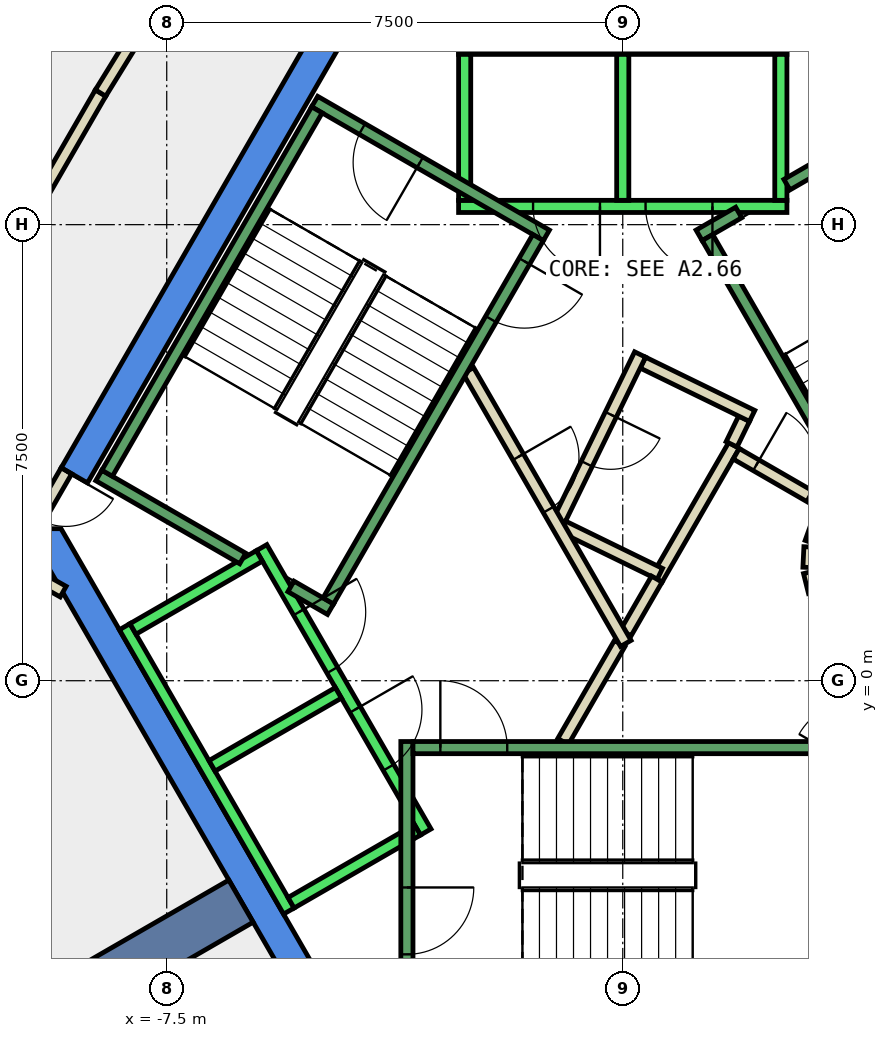
"""IFC4 building model, lengths in metres.
Left out: names, types, materials, properties, quantities, classifications, styles, units other than length and angle.
Written with IfcOpenShell. Run it as: python <this file> out.ifc"""

import sys

from ifc_helpers import new_model, si_unit, direction, frame, frame_2d, origin, place, context, subcontext, project, spatial, polyline, rectangle, outline, extrude, element, fill, save


model = new_model("IFC4")
c1 = context("Model", 3, precision=1e-05, world=origin(), true_north=direction((0.0, 1.0)))
c2 = subcontext(c1, "Body", "Model", "MODEL_VIEW")
j1 = project(units=[si_unit("LENGTHUNIT", "METRE"), si_unit("PLANEANGLEUNIT", "RADIAN")], contexts=[c1])
p1 = place(None, origin())
s1 = spatial("IfcSite", under=j1, at=p1, CompositionType="ELEMENT")
p2 = place(p1, origin())
s2 = spatial("IfcBuilding", under=s1, at=p2, CompositionType="ELEMENT")
p3 = place(p2, frame((0.0, 0.0, 315.2)))
s3 = spatial("IfcBuildingStorey", under=s2, at=p3, CompositionType="ELEMENT", Elevation=315.2)
p4 = place(p3, frame((0.0, 0.0, -0.34)))
e1 = element("IfcWall", 1, at=p4, inside=s3, PredefinedType="SHEAR", context=c2, shape_type="SweptSolid", body=[
    extrude(outline(polyline([(-9.236, 3.502), (-8.803, 3.253), (-4.619, 10.5), (-4.907, 11.0), (-9.236, 3.502)])), origin(), (0.0, 0.0, 1.0), 3.6),
])
p5 = place(p3, frame((0.0, 0.0, -0.34)))
e2 = element("IfcWall", 2, at=p5, inside=s3, PredefinedType="SHEAR", context=c2, shape_type="SweptSolid", body=[
    extrude(outline(polyline([(-9.815, 2.5), (-4.907, -6.0), (-4.619, -5.5), (-9.238, 2.5), (-9.815, 2.5)])), origin(), (0.0, 0.0, 1.0), 3.6),
])
p6 = place(p3, frame((-6.279, -3.625, -0.34), z_axis=(0.0, 0.0, 1.0), x_axis=(-0.866017533419, -0.500013631625, 0.0)))
e3 = element("IfcWall", 3, at=p6, inside=s3, PredefinedType="SHEAR", context=c2, shape_type="SweptSolid", body=[
    extrude(rectangle(XDim=9.0, YDim=0.8, at=frame_2d((4.5, 0.0))), origin(), (0.0, 0.0, 1.0), 3.6),
])
p7 = place(p3, frame((0.56, 1.671, 0.0), z_axis=(0.0, 0.0, 1.0), x_axis=(0.500008334558, 0.866020591771, 0.0)))
e4 = element("IfcWall", 4, at=p7, inside=s3, PredefinedType="PARTITIONING", context=c2, shape_type="SweptSolid", body=[
    extrude(rectangle(XDim=2.538, YDim=0.2, at=frame_2d((1.269, 0.0))), origin(), (0.0, 0.0, 1.0), 3.26),
])
p8 = place(p3, frame((1.79, 3.888, 0.0), z_axis=(0.0, 0.0, 1.0), x_axis=(0.437807406823, 0.899068781869, 0.0)))
e5 = element("IfcWall", 5, at=p8, inside=s3, PredefinedType="PARTITIONING", context=c2, shape_type="SweptSolid", body=[
    extrude(rectangle(XDim=0.469, YDim=0.2, at=frame_2d((0.234, 0.0))), origin(), (0.0, 0.0, 1.0), 3.26),
])
p9 = place(p3, frame((2.128, 4.355, 0.0), z_axis=(0.0, 0.0, 1.0), x_axis=(-0.898876404494, 0.438202247191, 0.0)))
e6 = element("IfcWall", 6, at=p9, inside=s3, PredefinedType="PARTITIONING", context=c2, shape_type="SweptSolid", body=[
    extrude(rectangle(XDim=1.999, YDim=0.2, at=frame_2d((1.0, 0.0))), origin(), (0.0, 0.0, 1.0), 3.26),
])
p10 = place(p3, frame((0.285, 5.365, 0.0), z_axis=(0.0, 0.0, 1.0), x_axis=(-0.43840190643, -0.898779043168, 0.0)))
e7 = element("IfcWall", 7, at=p10, inside=s3, PredefinedType="PARTITIONING", context=c2, shape_type="SweptSolid", body=[
    extrude(rectangle(XDim=3.1, YDim=0.2, at=frame_2d((1.55, 0.0))), origin(), (0.0, 0.0, 1.0), 3.26),
])
p11 = place(p10, frame((1.1, 0.0, 0.0)))
e8 = element("IfcOpeningElement", 8, at=p11, cuts=e7, PredefinedType="OPENING", context=c2, shape_type="SweptSolid", body=[
    extrude(rectangle(XDim=0.9, YDim=2.1, at=frame_2d((0.45, 1.05))), frame((0.0, 0.11, 0.0), z_axis=(0.0, -1.0, 0.0), x_axis=(1.0, 0.0, 0.0)), (0.0, 0.0, 1.0), 0.22),
])
p12 = place(p3, frame((-0.984, 2.535, 0.0), z_axis=(0.0, 0.0, 1.0), x_axis=(0.898707583217, -0.438548378025, 0.0)))
e9 = element("IfcWall", 9, at=p12, inside=s3, PredefinedType="PARTITIONING", context=c2, shape_type="SweptSolid", body=[
    extrude(rectangle(XDim=1.774, YDim=0.2, at=frame_2d((0.887, 0.0))), origin(), (0.0, 0.0, 1.0), 3.26),
])
p13 = place(p3, frame((-9.203, 1.465, 0.0), z_axis=(0.0, 0.0, 1.0), x_axis=(-0.872341127106, 0.488897696823, 0.0)))
e10 = element("IfcWall", 10, at=p13, inside=s3, PredefinedType="PARTITIONING", context=c2, shape_type="SweptSolid", body=[
    extrude(rectangle(XDim=1.667, YDim=0.2, at=frame_2d((0.833, 0.0))), origin(), (0.0, 0.0, 1.0), 3.26),
])
p14 = place(p3, frame((-12.701, 2.54, 0.0), z_axis=(0.0, 0.0, 1.0), x_axis=(0.499946799636, 0.86605611685, 0.0)))
e11 = element("IfcWall", 11, at=p14, inside=s3, PredefinedType="PARTITIONING", context=c2, shape_type="SweptSolid", body=[
    extrude(rectangle(XDim=8.227, YDim=0.2, at=frame_2d((4.114, 0.0))), origin(), (0.0, 0.0, 1.0), 3.26),
])
p15 = place(p14, frame((3.613, 0.0, 0.0)))
e12 = element("IfcOpeningElement", 12, at=p15, cuts=e11, PredefinedType="OPENING", context=c2, shape_type="SweptSolid", body=[
    extrude(rectangle(XDim=1.0, YDim=2.1, at=frame_2d((0.5, 1.05))), frame((0.0, 0.11, 0.0), z_axis=(0.0, -1.0, 0.0), x_axis=(1.0, 0.0, 0.0)), (0.0, 0.0, 1.0), 0.22),
])
p16 = place(p3, frame((-8.588, 9.665, 0.0), z_axis=(0.0, 0.0, 1.0), x_axis=(0.525142215688, 0.851014484778, 0.0)))
e13 = element("IfcWall", 13, at=p16, inside=s3, PredefinedType="PARTITIONING", context=c2, shape_type="SweptSolid", body=[
    extrude(rectangle(XDim=7.872, YDim=0.2, at=frame_2d((3.936, 0.0))), origin(), (0.0, 0.0, 1.0), 3.26),
])
p17 = place(p3, frame((-0.982, -1.0, 0.0), z_axis=(0.0, 0.0, 1.0), x_axis=(0.50024047865, 0.865886518847, 0.0)))
e14 = element("IfcWall", 14, at=p17, inside=s3, PredefinedType="PARTITIONING", context=c2, shape_type="SweptSolid", body=[
    extrude(rectangle(XDim=1.863, YDim=0.2, at=frame_2d((0.931, 0.0))), origin(), (0.0, 0.0, 1.0), 3.26),
])
p18 = place(p3, frame((0.05, 0.787, 0.0), z_axis=(0.0, 0.0, 1.0), x_axis=(0.499819111317, 0.866129814729, 0.0)))
e15 = element("IfcWall", 15, at=p18, inside=s3, PredefinedType="PARTITIONING", context=c2, shape_type="SweptSolid", body=[
    extrude(rectangle(XDim=1.021, YDim=0.2, at=frame_2d((0.51, 0.0))), origin(), (0.0, 0.0, 1.0), 3.26),
])
p19 = place(p3, frame((1.866, 3.732, 0.0), z_axis=(0.0, 0.0, 1.0), x_axis=(0.866043361281, -0.499968895414, 0.0)))
e16 = element("IfcWall", 16, at=p19, inside=s3, PredefinedType="PARTITIONING", context=c2, shape_type="SweptSolid", body=[
    extrude(rectangle(XDim=1.858, YDim=0.2, at=frame_2d((0.929, 0.0))), origin(), (0.0, 0.0, 1.0), 3.26),
])
p20 = place(p19, frame((0.379, 0.0, 0.0)))
e17 = element("IfcOpeningElement", 17, at=p20, cuts=e16, PredefinedType="OPENING", context=c2, shape_type="SweptSolid", body=[
    extrude(rectangle(XDim=1.0, YDim=2.1, at=frame_2d((0.5, 1.05))), frame((0.0, 0.11, 0.0), z_axis=(0.0, -1.0, 0.0), x_axis=(1.0, 0.0, 0.0)), (0.0, 0.0, 1.0), 0.22),
])
p21 = place(p3, frame((3.208, 2.592, 0.0), z_axis=(0.0, 0.0, 1.0), x_axis=(-0.337388820924, -0.941365382578, 0.0)))
e18 = element("IfcWall", 18, at=p21, inside=s3, PredefinedType="PARTITIONING", context=c2, shape_type="SweptSolid", body=[
    extrude(rectangle(XDim=0.338, YDim=0.2, at=frame_2d((0.169, 0.0))), origin(), (0.0, 0.0, 1.0), 3.26),
])
p22 = place(p3, frame((3.079, 2.199, 0.0), z_axis=(0.0, 0.0, 1.0), x_axis=(-0.047771483479, -0.998858290933, 0.0)))
e19 = element("IfcWall", 19, at=p22, inside=s3, PredefinedType="PARTITIONING", context=c2, shape_type="SweptSolid", body=[
    extrude(rectangle(XDim=0.337, YDim=0.2, at=frame_2d((0.169, 0.0))), origin(), (0.0, 0.0, 1.0), 3.26),
])
p23 = place(p3, frame((3.07, 1.786, 0.0), z_axis=(0.0, 0.0, 1.0), x_axis=(0.242705583207, -0.970099994784, 0.0)))
e20 = element("IfcWall", 20, at=p23, inside=s3, PredefinedType="PARTITIONING", context=c2, shape_type="SweptSolid", body=[
    extrude(rectangle(XDim=0.338, YDim=0.2, at=frame_2d((0.169, 0.0))), origin(), (0.0, 0.0, 1.0), 3.26),
])
p24 = place(p3, frame((-2.54, 5.1, 0.0), z_axis=(0.0, 0.0, 1.0), x_axis=(0.499925051871, -0.866068670783, 0.0)))
e21 = element("IfcWall", 21, at=p24, inside=s3, PredefinedType="PARTITIONING", context=c2, shape_type="SweptSolid", body=[
    extrude(rectangle(XDim=5.181, YDim=0.2, at=frame_2d((2.59, 0.0))), origin(), (0.0, 0.0, 1.0), 3.26),
])
p25 = place(p24, frame((1.64, 0.0, 0.0)))
e22 = element("IfcOpeningElement", 22, at=p25, cuts=e21, PredefinedType="OPENING", context=c2, shape_type="SweptSolid", body=[
    extrude(rectangle(XDim=1.0, YDim=2.1, at=frame_2d((0.5, 1.05))), frame((0.0, 0.11, 0.0), z_axis=(0.0, -1.0, 0.0), x_axis=(1.0, 0.0, 0.0)), (0.0, 0.0, 1.0), 0.22),
])
p26 = place(p3, frame((-9.15, 3.452, 0.0), z_axis=(0.0, 0.0, 1.0), x_axis=(-0.500079945886, -0.865979242085, 0.0)))
e23 = element("IfcWall", 23, at=p26, inside=s3, PredefinedType="PARTITIONING", context=c2, shape_type="SweptSolid", body=[
    extrude(rectangle(XDim=0.926, YDim=0.2, at=frame_2d((0.463, 0.0))), origin(), (0.0, 0.0, 1.0), 2.4),
])
p27 = place(p26, frame((0.017, 0.0, 0.0)))
e24 = element("IfcOpeningElement", 24, at=p27, cuts=e23, PredefinedType="OPENING", context=c2, shape_type="SweptSolid", body=[
    extrude(rectangle(XDim=0.9, YDim=2.1, at=frame_2d((0.45, 1.05))), frame((0.0, 0.11, 0.0), z_axis=(0.0, -1.0, 0.0), x_axis=(1.0, 0.0, 0.0)), (0.0, 0.0, 1.0), 0.22),
])
p28 = place(p3, frame((2.7, 7.8, 0.0), z_axis=(0.0, 0.0, 1.0), x_axis=(-1.0, 0.0, 0.0)))
e25 = element("IfcWall", 25, at=p28, inside=s3, PredefinedType="STANDARD", context=c2, shape_type="SweptSolid", body=[
    extrude(rectangle(XDim=5.4, YDim=0.2, at=frame_2d((2.7, 0.0))), origin(), (0.0, 0.0, 1.0), 3.26),
])
p29 = place(p28, frame((1.225, 0.0, 0.0)))
e26 = element("IfcOpeningElement", 26, at=p29, cuts=e25, PredefinedType="OPENING", context=c2, shape_type="SweptSolid", body=[
    extrude(rectangle(XDim=1.1, YDim=2.1, at=frame_2d((0.55, 1.05))), frame((0.0, 0.11, 0.0), z_axis=(0.0, -1.0, 0.0), x_axis=(1.0, 0.0, 0.0)), (0.0, 0.0, 1.0), 0.22),
])
p30 = place(p28, frame((3.075, 0.0, 0.0)))
e27 = element("IfcOpeningElement", 27, at=p30, cuts=e25, PredefinedType="OPENING", context=c2, shape_type="SweptSolid", body=[
    extrude(rectangle(XDim=1.1, YDim=2.1, at=frame_2d((0.55, 1.05))), frame((0.0, 0.11, 0.0), z_axis=(0.0, -1.0, 0.0), x_axis=(1.0, 0.0, 0.0)), (0.0, 0.0, 1.0), 0.22),
])
p31 = place(p3, frame((2.7, 10.4, 0.0), z_axis=(0.0, 0.0, 1.0), x_axis=(-1.0, 0.0, 0.0)))
e28 = element("IfcWall", 28, at=p31, inside=s3, PredefinedType="STANDARD", context=c2, shape_type="SweptSolid", body=[
    extrude(rectangle(XDim=5.4, YDim=0.2, at=frame_2d((2.7, 0.0))), origin(), (0.0, 0.0, 1.0), 3.26),
])
for number, where, z_axis, x_axis in (
    (29, (2.6, 7.9, 0.0), (0.0, 0.0, 1.0), (0.0, 1.0, 0.0)),
    (30, (0.0, 7.9, 0.0), (0.0, 0.0, 1.0), (0.0, 1.0, 0.0)),
    (31, (-2.6, 7.9, 0.0), (0.0, 0.0, 1.0), (0.0, 1.0, 0.0)),
):
    element("IfcWall", number, at=place(p3, frame(where, z_axis=z_axis, x_axis=x_axis)), inside=s3, PredefinedType="STANDARD", context=c2, shape_type="SweptSolid", body=[
        extrude(rectangle(XDim=2.4, YDim=0.2, at=frame_2d((1.2, 0.0))), origin(), (0.0, 0.0, 1.0), 3.26),
    ])
p32 = place(p3, frame((-5.94, 2.188, 0.0), z_axis=(0.0, 0.0, 1.0), x_axis=(0.500034260056, -0.866005622828, 0.0)))
e32 = element("IfcWall", 32, at=p32, inside=s3, PredefinedType="STANDARD", context=c2, shape_type="SweptSolid", body=[
    extrude(rectangle(XDim=5.399, YDim=0.2, at=frame_2d((2.7, 0.0))), origin(), (0.0, 0.0, 1.0), 3.26),
])
p33 = place(p32, frame((3.075, 0.0, 0.0)))
e33 = element("IfcOpeningElement", 33, at=p33, cuts=e32, PredefinedType="OPENING", context=c2, shape_type="SweptSolid", body=[
    extrude(rectangle(XDim=1.1, YDim=2.1, at=frame_2d((0.55, 1.05))), frame((0.0, 0.11, 0.0), z_axis=(0.0, -1.0, 0.0), x_axis=(1.0, 0.0, 0.0)), (0.0, 0.0, 1.0), 0.22),
])
p34 = place(p32, frame((1.225, 0.0, 0.0)))
e34 = element("IfcOpeningElement", 34, at=p34, cuts=e32, PredefinedType="OPENING", context=c2, shape_type="SweptSolid", body=[
    extrude(rectangle(XDim=1.1, YDim=2.1, at=frame_2d((0.55, 1.05))), frame((0.0, 0.11, 0.0), z_axis=(0.0, -1.0, 0.0), x_axis=(1.0, 0.0, 0.0)), (0.0, 0.0, 1.0), 0.22),
])
p35 = place(p3, frame((-8.192, 0.888, 0.0), z_axis=(0.0, 0.0, 1.0), x_axis=(0.500034260056, -0.866005622828, 0.0)))
e35 = element("IfcWall", 35, at=p35, inside=s3, PredefinedType="STANDARD", context=c2, shape_type="SweptSolid", body=[
    extrude(rectangle(XDim=5.399, YDim=0.2, at=frame_2d((2.7, 0.0))), origin(), (0.0, 0.0, 1.0), 3.26),
])
for number, where, z_axis, x_axis in (
    (36, (-5.977, 2.052, 0.0), (0.0, 0.0, 1.0), (-0.866, -0.5, 0.0)),
    (37, (-4.677, -0.2, 0.0), (0.0, 0.0, 1.0), (-0.866, -0.5, 0.0)),
):
    element("IfcWall", number, at=place(p3, frame(where, z_axis=z_axis, x_axis=x_axis)), inside=s3, PredefinedType="STANDARD", context=c2, shape_type="SweptSolid", body=[
        extrude(rectangle(XDim=2.399, YDim=0.2, at=frame_2d((1.2, 0.0))), origin(), (0.0, 0.0, 1.0), 3.26),
    ])
p36 = place(p3, frame((-3.377, -2.452, 0.0), z_axis=(0.0, 0.0, 1.0), x_axis=(-0.865955154139, -0.50012165622, 0.0)))
e38 = element("IfcWall", 38, at=p36, inside=s3, PredefinedType="STANDARD", context=c2, shape_type="SweptSolid", body=[
    extrude(rectangle(XDim=2.4, YDim=0.2, at=frame_2d((1.2, 0.0))), origin(), (0.0, 0.0, 1.0), 3.26),
])
p37 = place(p3, frame((-3.55, -1.0, 0.0), z_axis=(0.0, 0.0, 1.0), x_axis=(0.0, -1.0, 0.0)))
e39 = element("IfcWall", 39, at=p37, inside=s3, PredefinedType="STANDARD", context=c2, shape_type="SweptSolid", body=[
    extrude(rectangle(XDim=4.4, YDim=0.2, at=frame_2d((2.2, 0.0))), origin(), (0.0, 0.0, 1.0), 3.26),
])
p38 = place(p37, frame((2.4, 0.0, 0.0)))
e40 = element("IfcOpeningElement", 40, at=p38, cuts=e39, PredefinedType="OPENING", context=c2, shape_type="SweptSolid", body=[
    extrude(rectangle(XDim=1.1, YDim=2.2, at=frame_2d((0.55, 1.1))), frame((0.0, 0.11, 0.0), z_axis=(0.0, -1.0, 0.0), x_axis=(1.0, 0.0, 0.0)), (0.0, 0.0, 1.0), 0.22),
])
p39 = place(p3, frame((-3.45, -1.1, 0.0), z_axis=(0.0, 0.0, 1.0), x_axis=(1.0, 0.0, 0.0)))
e41 = element("IfcWall", 41, at=p39, inside=s3, PredefinedType="STANDARD", context=c2, shape_type="SweptSolid", body=[
    extrude(rectangle(XDim=6.9, YDim=0.2, at=frame_2d((3.45, 0.0))), origin(), (0.0, 0.0, 1.0), 3.26),
])
p40 = place(p39, frame((0.45, 0.0, 0.0)))
e42 = element("IfcOpeningElement", 42, at=p40, cuts=e41, PredefinedType="OPENING", context=c2, shape_type="SweptSolid", body=[
    extrude(rectangle(XDim=1.1, YDim=2.2, at=frame_2d((0.55, 1.1))), frame((0.0, 0.11, 0.0), z_axis=(0.0, -1.0, 0.0), x_axis=(1.0, 0.0, 0.0)), (0.0, 0.0, 1.0), 0.22),
])
p41 = place(p3, frame((2.7, 8.158, 0.0), z_axis=(0.0, 0.0, 1.0), x_axis=(0.86611865017, 0.499838457731, 0.0)))
e43 = element("IfcWall", 43, at=p41, inside=s3, PredefinedType="STANDARD", context=c2, shape_type="SweptSolid", body=[
    extrude(rectangle(XDim=2.733, YDim=0.2, at=frame_2d((1.366, 0.0))), origin(), (0.0, 0.0, 1.0), 3.26),
])
p42 = place(p3, frame((1.256, 7.324, 0.0), z_axis=(0.0, 0.0, 1.0), x_axis=(0.865915093549, 0.500191014278, 0.0)))
e44 = element("IfcWall", 44, at=p42, inside=s3, PredefinedType="STANDARD", context=c2, shape_type="SweptSolid", body=[
    extrude(rectangle(XDim=0.752, YDim=0.2, at=frame_2d((0.376, 0.0))), origin(), (0.0, 0.0, 1.0), 3.26),
])
p43 = place(p3, frame((4.843, 1.312, 0.0), z_axis=(0.0, 0.0, 1.0), x_axis=(-0.499963383562, 0.866046543262, 0.0)))
e45 = element("IfcWall", 45, at=p43, inside=s3, PredefinedType="STANDARD", context=c2, shape_type="SweptSolid", body=[
    extrude(rectangle(XDim=6.9, YDim=0.2, at=frame_2d((3.45, 0.0))), origin(), (0.0, 0.0, 1.0), 3.26),
])
p44 = place(p43, frame((0.45, 0.0, 0.0)))
e46 = element("IfcOpeningElement", 46, at=p44, cuts=e45, PredefinedType="OPENING", context=c2, shape_type="SweptSolid", body=[
    extrude(rectangle(XDim=1.1, YDim=2.2, at=frame_2d((0.55, 1.1))), frame((0.0, 0.11, 0.0), z_axis=(0.0, -1.0, 0.0), x_axis=(1.0, 0.0, 0.0)), (0.0, 0.0, 1.0), 0.22),
])
p45 = place(p3, frame((-1.256, 7.324, 0.0), z_axis=(0.0, 0.0, 1.0), x_axis=(-0.866046073146, 0.499964197906, 0.0)))
e47 = element("IfcWall", 47, at=p45, inside=s3, PredefinedType="STANDARD", context=c2, shape_type="SweptSolid", body=[
    extrude(rectangle(XDim=4.4, YDim=0.2, at=frame_2d((2.2, 0.0))), origin(), (0.0, 0.0, 1.0), 3.26),
])
p46 = place(p45, frame((2.4, 0.0, 0.0)))
e48 = element("IfcOpeningElement", 48, at=p46, cuts=e47, PredefinedType="OPENING", context=c2, shape_type="SweptSolid", body=[
    extrude(rectangle(XDim=1.1, YDim=2.2, at=frame_2d((0.55, 1.1))), frame((0.0, 0.11, 0.0), z_axis=(0.0, -1.0, 0.0), x_axis=(1.0, 0.0, 0.0)), (0.0, 0.0, 1.0), 0.22),
])
p47 = place(p3, frame((-6.25, 2.01, 0.0), z_axis=(0.0, 0.0, 1.0), x_axis=(-0.86611865017, 0.499838457731, 0.0)))
e49 = element("IfcWall", 49, at=p47, inside=s3, PredefinedType="STANDARD", context=c2, shape_type="SweptSolid", body=[
    extrude(rectangle(XDim=2.733, YDim=0.2, at=frame_2d((1.366, 0.0))), origin(), (0.0, 0.0, 1.0), 3.26),
])
p48 = place(p3, frame((-4.806, 1.176, 0.0), z_axis=(0.0, 0.0, 1.0), x_axis=(-0.866558586415, 0.499075361355, 0.0)))
e50 = element("IfcWall", 50, at=p48, inside=s3, PredefinedType="STANDARD", context=c2, shape_type="SweptSolid", body=[
    extrude(rectangle(XDim=0.751, YDim=0.2, at=frame_2d((0.376, 0.0))), origin(), (0.0, 0.0, 1.0), 3.26),
])
p49 = place(p3, frame((-1.393, 7.288, 0.0), z_axis=(0.0, 0.0, 1.0), x_axis=(-0.499963383562, -0.866046543262, 0.0)))
e51 = element("IfcWall", 51, at=p49, inside=s3, PredefinedType="STANDARD", context=c2, shape_type="SweptSolid", body=[
    extrude(rectangle(XDim=6.9, YDim=0.2, at=frame_2d((3.45, 0.0))), origin(), (0.0, 0.0, 1.0), 3.26),
])
p50 = place(p49, frame((0.45, 0.0, 0.0)))
e52 = element("IfcOpeningElement", 52, at=p50, cuts=e51, PredefinedType="OPENING", context=c2, shape_type="SweptSolid", body=[
    extrude(rectangle(XDim=1.1, YDim=2.2, at=frame_2d((0.55, 1.1))), frame((0.0, 0.11, 0.0), z_axis=(0.0, -1.0, 0.0), x_axis=(1.0, 0.0, 0.0)), (0.0, 0.0, 1.0), 0.22),
])
p51 = place(p3, frame((-5.03, 9.388, 0.0), z_axis=(0.0, 0.0, 1.0), x_axis=(-0.499978703459, -0.866037698999, 0.0)))
e53 = element("IfcWall", 53, at=p51, inside=s3, PredefinedType="STANDARD", context=c2, shape_type="SweptSolid", body=[
    extrude(rectangle(XDim=6.9, YDim=0.2, at=frame_2d((3.45, 0.0))), origin(), (0.0, 0.0, 1.0), 3.26),
])
p52 = place(p20, origin())
e54 = element("IfcDoor", 54, at=p52, inside=s3, OperationType="SINGLE_SWING_LEFT", PredefinedType="DOOR", context=c2, shape_type="SweptSolid", body=[
    extrude(rectangle(XDim=1.0, YDim=2.1, at=frame_2d((0.5, 1.05))), frame((0.0, 0.025, 0.0), z_axis=(0.0, -1.0, 0.0), x_axis=(1.0, 0.0, 0.0)), (0.0, 0.0, 1.0), 0.05),
])
fill(e17, e54)
p53 = place(p25, origin())
e55 = element("IfcDoor", 55, at=p53, inside=s3, OperationType="SINGLE_SWING_RIGHT", PredefinedType="DOOR", context=c2, shape_type="SweptSolid", body=[
    extrude(rectangle(XDim=1.0, YDim=2.1, at=frame_2d((0.5, 1.05))), frame((0.0, 0.025, 0.0), z_axis=(0.0, -1.0, 0.0), x_axis=(1.0, 0.0, 0.0)), (0.0, 0.0, 1.0), 0.05),
])
fill(e22, e55)
p54 = place(p11, origin())
e56 = element("IfcDoor", 56, at=p54, inside=s3, OperationType="SINGLE_SWING_RIGHT", PredefinedType="DOOR", context=c2, shape_type="SweptSolid", body=[
    extrude(rectangle(XDim=0.9, YDim=2.1, at=frame_2d((0.45, 1.05))), frame((0.0, 0.025, 0.0), z_axis=(0.0, -1.0, 0.0), x_axis=(1.0, 0.0, 0.0)), (0.0, 0.0, 1.0), 0.05),
])
fill(e8, e56)
p55 = place(p27, origin())
e57 = element("IfcDoor", 57, at=p55, inside=s3, OperationType="SINGLE_SWING_LEFT", PredefinedType="DOOR", context=c2, shape_type="SweptSolid", body=[
    extrude(rectangle(XDim=0.9, YDim=2.1, at=frame_2d((0.45, 1.05))), frame((0.0, 0.025, 0.0), z_axis=(0.0, -1.0, 0.0), x_axis=(1.0, 0.0, 0.0)), (0.0, 0.0, 1.0), 0.05),
])
fill(e24, e57)
p56 = place(p29, origin())
e58 = element("IfcDoor", 58, at=p56, inside=s3, OperationType="SLIDING_TO_LEFT", PredefinedType="DOOR", context=c2, shape_type="SweptSolid", body=[
    extrude(rectangle(XDim=1.1, YDim=2.1, at=frame_2d((0.55, 1.05))), frame((0.0, 0.025, 0.0), z_axis=(0.0, -1.0, 0.0), x_axis=(1.0, 0.0, 0.0)), (0.0, 0.0, 1.0), 0.05),
])
fill(e26, e58)
p57 = place(p30, origin())
e59 = element("IfcDoor", 59, at=p57, inside=s3, OperationType="SLIDING_TO_LEFT", PredefinedType="DOOR", context=c2, shape_type="SweptSolid", body=[
    extrude(rectangle(XDim=1.1, YDim=2.1, at=frame_2d((0.55, 1.05))), frame((0.0, 0.025, 0.0), z_axis=(0.0, -1.0, 0.0), x_axis=(1.0, 0.0, 0.0)), (0.0, 0.0, 1.0), 0.05),
])
fill(e27, e59)
p58 = place(p33, origin())
e60 = element("IfcDoor", 60, at=p58, inside=s3, OperationType="SLIDING_TO_LEFT", PredefinedType="DOOR", context=c2, shape_type="SweptSolid", body=[
    extrude(rectangle(XDim=1.1, YDim=2.1, at=frame_2d((0.55, 1.05))), frame((0.0, 0.025, 0.0), z_axis=(0.0, -1.0, 0.0), x_axis=(1.0, 0.0, 0.0)), (0.0, 0.0, 1.0), 0.05),
])
fill(e33, e60)
p59 = place(p34, origin())
e61 = element("IfcDoor", 61, at=p59, inside=s3, OperationType="SLIDING_TO_LEFT", PredefinedType="DOOR", context=c2, shape_type="SweptSolid", body=[
    extrude(rectangle(XDim=1.1, YDim=2.1, at=frame_2d((0.55, 1.05))), frame((0.0, 0.025, 0.0), z_axis=(0.0, -1.0, 0.0), x_axis=(1.0, 0.0, 0.0)), (0.0, 0.0, 1.0), 0.05),
])
fill(e34, e61)
p60 = place(p40, origin())
e62 = element("IfcDoor", 62, at=p60, inside=s3, OperationType="SINGLE_SWING_LEFT", PredefinedType="DOOR", context=c2, shape_type="SweptSolid", body=[
    extrude(rectangle(XDim=1.1, YDim=2.2, at=frame_2d((0.55, 1.1))), frame((0.0, 0.025, 0.0), z_axis=(0.0, -1.0, 0.0), x_axis=(1.0, 0.0, 0.0)), (0.0, 0.0, 1.0), 0.05),
])
fill(e42, e62)
p61 = place(p38, origin())
e63 = element("IfcDoor", 63, at=p61, inside=s3, OperationType="SINGLE_SWING_LEFT", PredefinedType="DOOR", context=c2, shape_type="SweptSolid", body=[
    extrude(rectangle(XDim=1.1, YDim=2.2, at=frame_2d((0.55, 1.1))), frame((0.0, 0.025, 0.0), z_axis=(0.0, -1.0, 0.0), x_axis=(1.0, 0.0, 0.0)), (0.0, 0.0, 1.0), 0.05),
])
fill(e40, e63)
p62 = place(p50, origin())
e64 = element("IfcDoor", 64, at=p62, inside=s3, OperationType="SINGLE_SWING_LEFT", PredefinedType="DOOR", context=c2, shape_type="SweptSolid", body=[
    extrude(rectangle(XDim=1.1, YDim=2.2, at=frame_2d((0.55, 1.1))), frame((0.0, 0.025, 0.0), z_axis=(0.0, -1.0, 0.0), x_axis=(1.0, 0.0, 0.0)), (0.0, 0.0, 1.0), 0.05),
])
fill(e52, e64)
p63 = place(p46, origin())
e65 = element("IfcDoor", 65, at=p63, inside=s3, OperationType="SINGLE_SWING_LEFT", PredefinedType="DOOR", context=c2, shape_type="SweptSolid", body=[
    extrude(rectangle(XDim=1.1, YDim=2.2, at=frame_2d((0.55, 1.1))), frame((0.0, 0.025, 0.0), z_axis=(0.0, -1.0, 0.0), x_axis=(1.0, 0.0, 0.0)), (0.0, 0.0, 1.0), 0.05),
])
fill(e48, e65)
save(model, sys.argv[1])
